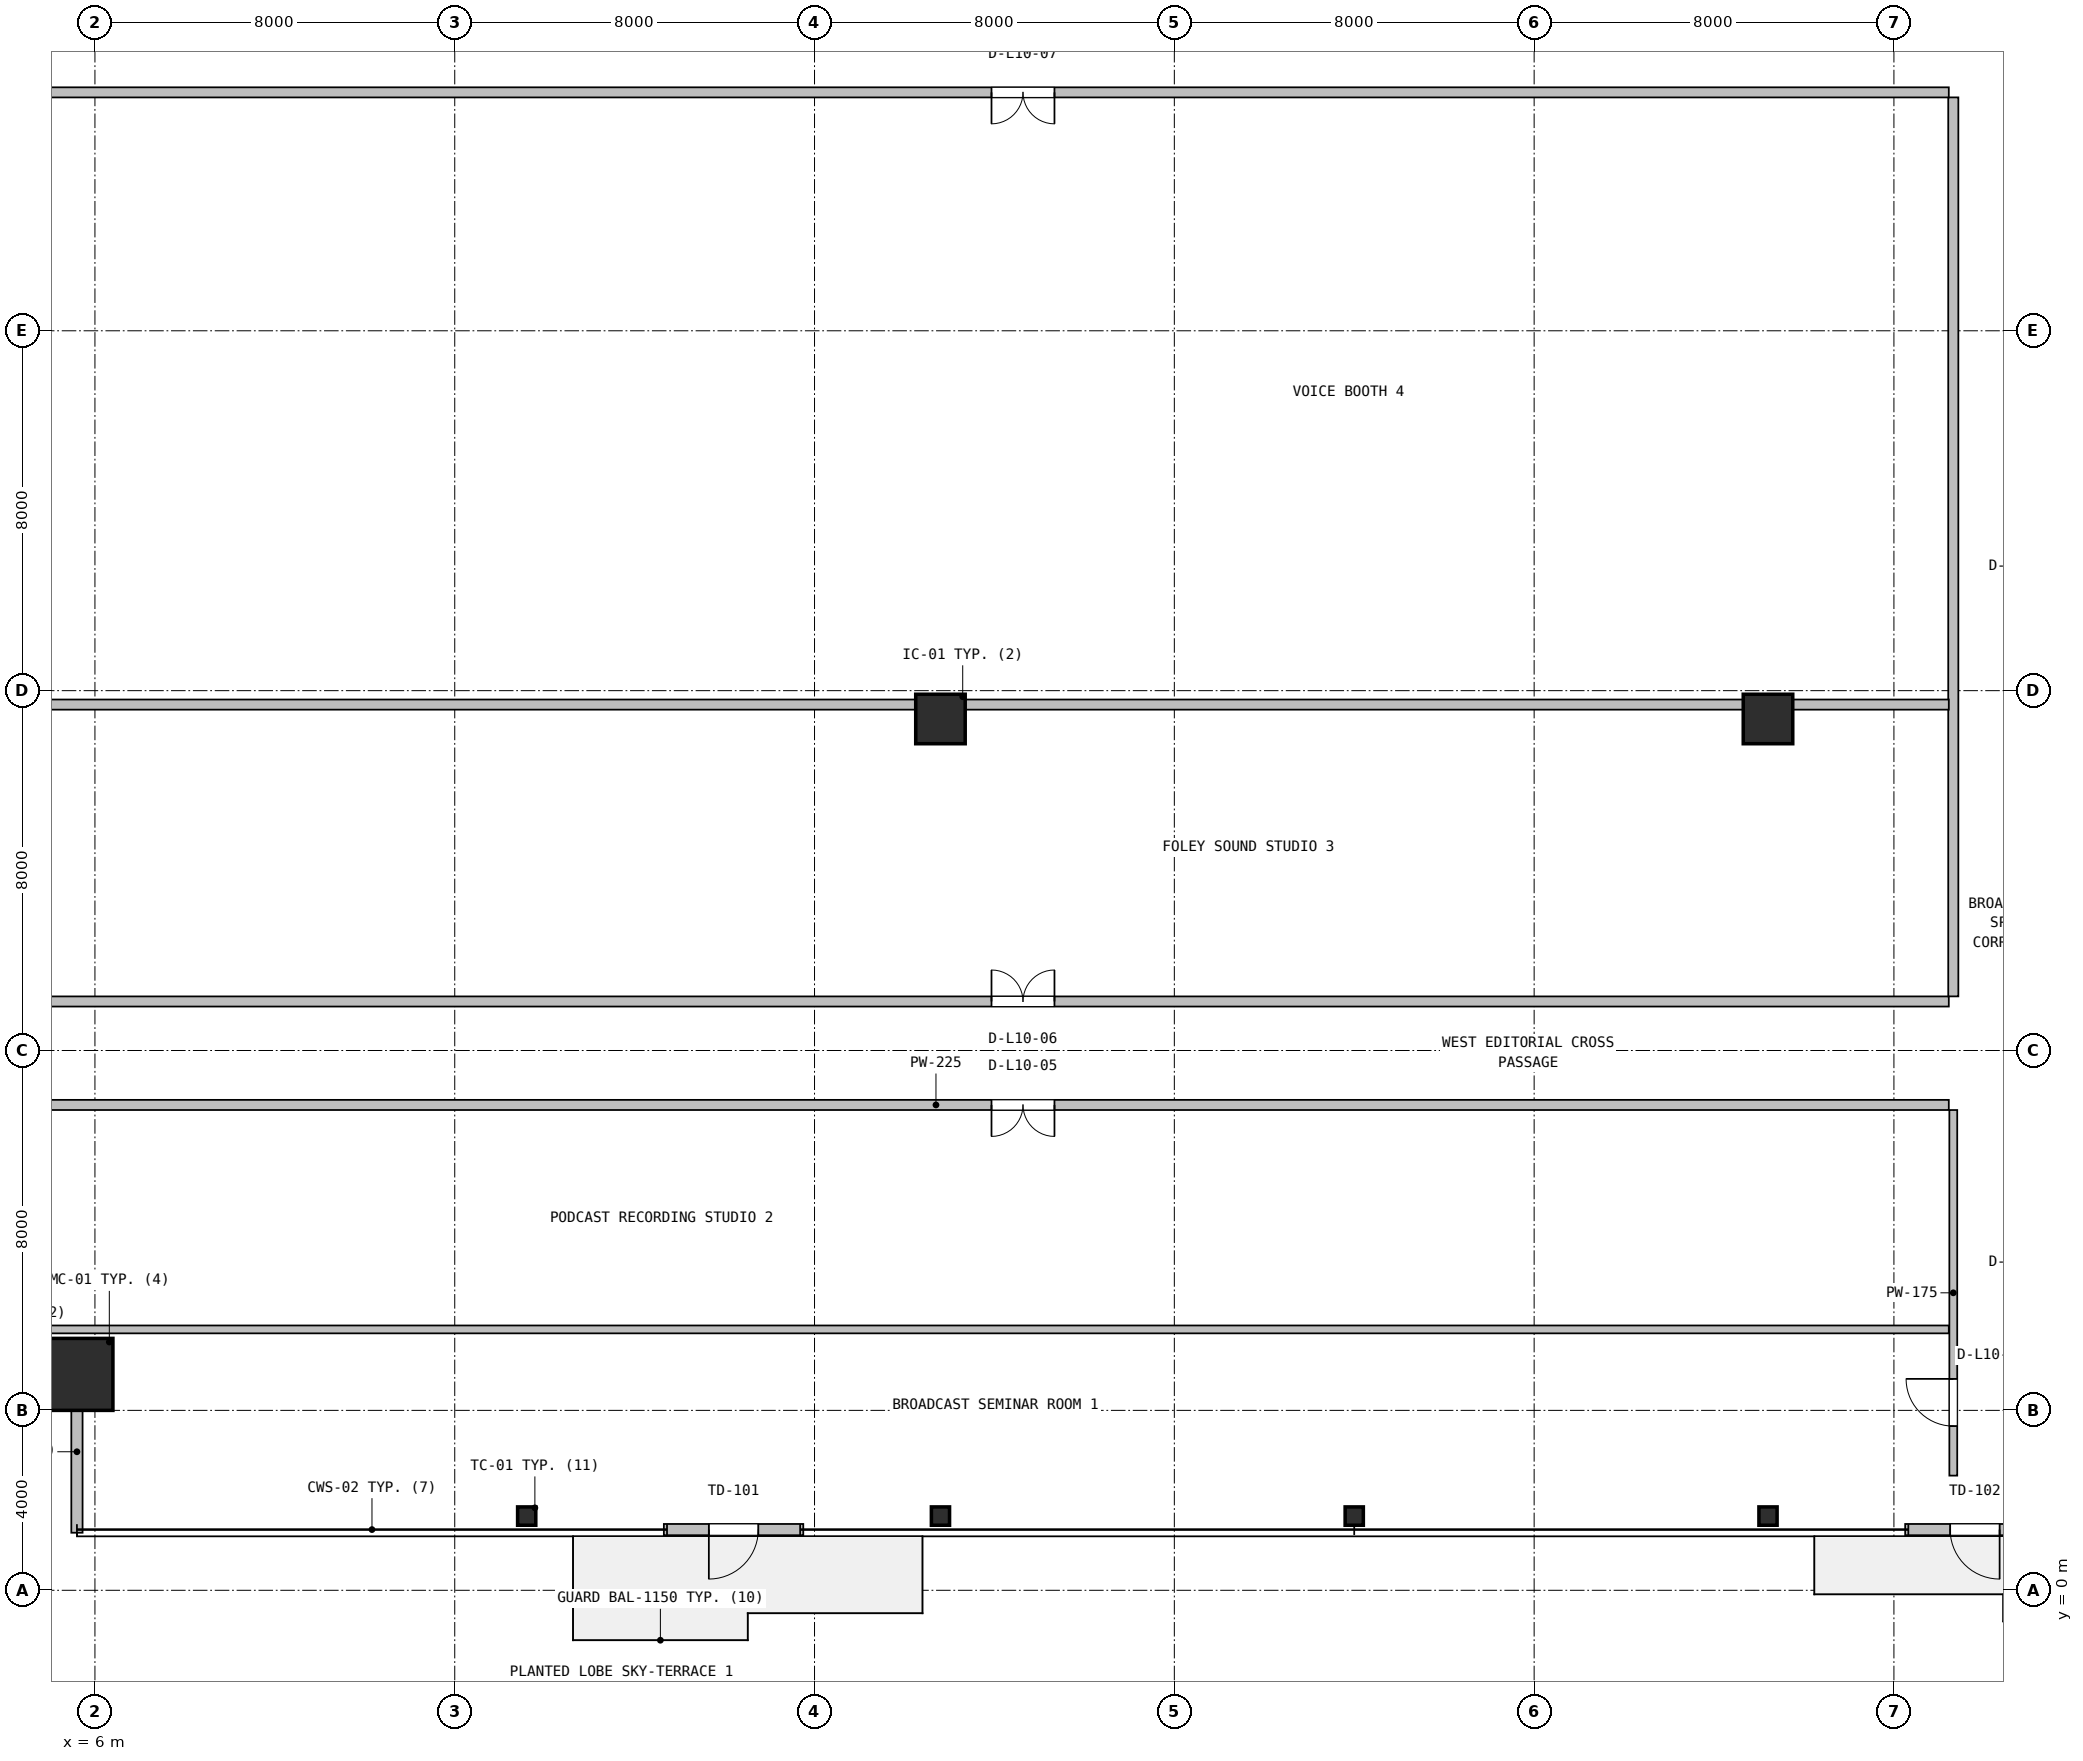
"""IFC4 building model, lengths in metres.
Left out: names, types, materials, properties, quantities, classifications, styles, units other than length and angle.
Written with IfcOpenShell. Run it as: python <this file> out.ifc"""

import sys

from ifc_helpers import new_model, si_unit, direction, frame, frame_2d, origin, origin_2d, place, context, subcontext, project, spatial, rectangle, hollow_rectangle, i_section, extrude, source, transform, mapped, element, fill, save


model = new_model("IFC4")
c1 = context("Model", 3, precision=1e-05, world=origin(), true_north=direction((0.0, 1.0)))
c2 = subcontext(c1, "Body", "Model", "MODEL_VIEW")
j1 = project(units=[si_unit("LENGTHUNIT", "METRE"), si_unit("PLANEANGLEUNIT", "RADIAN")], contexts=[c1])
p1 = place(None, origin())
s1 = spatial("IfcSite", under=j1, at=p1, CompositionType="ELEMENT")
p2 = place(p1, origin())
s2 = spatial("IfcBuilding", under=s1, at=p2, CompositionType="ELEMENT")
p3 = place(p2, frame((0.0, 0.0, 47.1)))
s3 = spatial("IfcBuildingStorey", under=s2, at=p3, CompositionType="ELEMENT", Elevation=47.1)
m1 = source(origin(), c2, "Body", "SweptSolid", [
    extrude(hollow_rectangle(XDim=1.6, YDim=1.6, WallThickness=0.06, at=origin_2d()), origin(), (0.0, 0.0, 1.0), 3.9),
])
p4 = place(p3, frame((5.6, 4.8, 0.0), z_axis=(0.0, 0.0, 1.0), x_axis=(1.0, 0.0, 0.0)))
e1 = element("IfcColumn", 1, at=p4, inside=s3, PredefinedType="COLUMN", context=c2, shape_type="MappedRepresentation", body=[
    mapped(m1, transform((0.0, 0.0, 0.0), x_axis=(1.0, 0.0, 0.0), y_axis=(0.0, 1.0, 0.0), z_axis=(0.0, 0.0, 1.0), scale=1.0)),
])
m2 = source(origin(), c2, "Body", "SweptSolid", [
    extrude(i_section(OverallWidth=0.404, OverallDepth=0.407, WebThickness=0.027, FlangeThickness=0.044, FilletRadius=0.018, at=origin_2d()), origin(), (0.0, 0.0, 1.0), 3.9),
])
for number, where, z_axis, x_axis in (
    (2, (15.6, 1.65, 0.0), (0.0, 0.0, 1.0), (1.0, 0.0, 0.0)),
    (3, (24.8, 1.65, 0.0), (0.0, 0.0, 1.0), (1.0, 0.0, 0.0)),
    (4, (34.0, 1.65, 0.0), (0.0, 0.0, 1.0), (1.0, 0.0, 0.0)),
    (5, (43.2, 1.65, 0.0), (0.0, 0.0, 1.0), (1.0, 0.0, 0.0)),
):
    element("IfcColumn", number, at=place(p3, frame(where, z_axis=z_axis, x_axis=x_axis)), inside=s3, PredefinedType="COLUMN", context=c2, shape_type="MappedRepresentation", body=[
        mapped(m2, transform((0.0, 0.0, 0.0), x_axis=(1.0, 0.0, 0.0), y_axis=(0.0, 1.0, 0.0), z_axis=(0.0, 0.0, 1.0), scale=1.0)),
    ])
m3 = source(origin(), c2, "Body", "SweptSolid", [
    extrude(rectangle(XDim=1.1, YDim=1.1, at=origin_2d()), origin(), (0.0, 0.0, 1.0), 3.9),
])
for number, where, z_axis, x_axis in (
    (6, (24.8, 19.37, 0.0), (0.0, 0.0, 1.0), (1.0, 0.0, 0.0)),
    (7, (43.2, 19.37, 0.0), (0.0, 0.0, 1.0), (1.0, 0.0, 0.0)),
):
    element("IfcColumn", number, at=place(p3, frame(where, z_axis=z_axis, x_axis=x_axis)), inside=s3, PredefinedType="COLUMN", context=c2, shape_type="MappedRepresentation", body=[
        mapped(m3, transform((0.0, 0.0, 0.0), x_axis=(1.0, 0.0, 0.0), y_axis=(0.0, 1.0, 0.0), z_axis=(0.0, 0.0, 1.0), scale=1.0)),
    ])
p5 = place(p3, frame((18.65, 1.35, 0.0), z_axis=(0.0, 0.0, 1.0), x_axis=(1.0, 0.0, 0.0)))
e8 = element("IfcWall", 8, at=p5, inside=s3, PredefinedType="SOLIDWALL", context=c2, shape_type="SweptSolid", body=[
    extrude(rectangle(XDim=3.1, YDim=0.25, at=frame_2d((1.55, 0.0))), origin(), (0.0, 0.0, 1.0), 3.63),
])
p6 = place(p5, frame((1.0, 0.0, 0.0)))
e9 = element("IfcOpeningElement", 9, at=p6, cuts=e8, PredefinedType="OPENING", context=c2, shape_type="SweptSolid", body=[
    extrude(rectangle(XDim=1.1, YDim=2.15, at=frame_2d((0.55, 1.075))), frame((0.0, 0.135, 0.0), z_axis=(0.0, -1.0, 0.0), x_axis=(1.0, 0.0, 0.0)), (0.0, 0.0, 1.0), 0.27),
])
p7 = place(p3, frame((46.25, 1.35, 0.0), z_axis=(0.0, 0.0, 1.0), x_axis=(1.0, 0.0, 0.0)))
e10 = element("IfcWall", 10, at=p7, inside=s3, PredefinedType="SOLIDWALL", context=c2, shape_type="SweptSolid", body=[
    extrude(rectangle(XDim=3.1, YDim=0.25, at=frame_2d((1.55, 0.0))), origin(), (0.0, 0.0, 1.0), 3.63),
])
p8 = place(p7, frame((1.0, 0.0, 0.0)))
e11 = element("IfcOpeningElement", 11, at=p8, cuts=e10, PredefinedType="OPENING", context=c2, shape_type="SweptSolid", body=[
    extrude(rectangle(XDim=1.1, YDim=2.15, at=frame_2d((0.55, 1.075))), frame((0.0, 0.135, 0.0), z_axis=(0.0, -1.0, 0.0), x_axis=(1.0, 0.0, 0.0)), (0.0, 0.0, 1.0), 0.27),
])
p9 = place(p3, frame((5.6, 1.28, 0.0), z_axis=(0.0, 0.0, 1.0), x_axis=(0.0, 1.0, 0.0)))
e12 = element("IfcWall", 12, at=p9, inside=s3, PredefinedType="SOLIDWALL", context=c2, shape_type="SweptSolid", body=[
    extrude(rectangle(XDim=3.6, YDim=0.25, at=frame_2d((1.8, 0.0))), origin(), (0.0, 0.0, 1.0), 3.208),
])
p10 = place(p3, frame((47.32, 2.55, 0.0), z_axis=(0.0, 0.0, 1.0), x_axis=(0.0, 1.0, 0.0)))
e13 = element("IfcWall", 13, at=p10, inside=s3, PredefinedType="PARTITIONING", context=c2, shape_type="SweptSolid", body=[
    extrude(rectangle(XDim=8.127, YDim=0.175, at=frame_2d((4.063, 0.0))), origin(), (0.0, 0.0, 1.0), 3.322),
])
p11 = place(p10, frame((1.1, 0.0, 0.0)))
e14 = element("IfcOpeningElement", 14, at=p11, cuts=e13, PredefinedType="OPENING", context=c2, shape_type="SweptSolid", body=[
    extrude(rectangle(XDim=1.05, YDim=2.1, at=frame_2d((0.525, 1.05))), frame((0.0, 0.098, 0.0), z_axis=(0.0, -1.0, 0.0), x_axis=(1.0, 0.0, 0.0)), (0.0, 0.0, 1.0), 0.195),
])
p12 = place(p3, frame((2.18, 5.8, 0.0), z_axis=(0.0, 0.0, 1.0), x_axis=(1.0, 0.0, 0.0)))
e15 = element("IfcWall", 15, at=p12, inside=s3, PredefinedType="PARTITIONING", context=c2, shape_type="SweptSolid", body=[
    extrude(rectangle(XDim=45.04, YDim=0.175, at=frame_2d((22.52, 0.0))), origin(), (0.0, 0.0, 1.0), 2.852),
])
p13 = place(p3, frame((2.18, 10.79, 0.0), z_axis=(0.0, 0.0, 1.0), x_axis=(1.0, 0.0, 0.0)))
e16 = element("IfcWall", 16, at=p13, inside=s3, PredefinedType="PARTITIONING", context=c2, shape_type="SweptSolid", body=[
    extrude(rectangle(XDim=45.04, YDim=0.225, at=frame_2d((22.52, 0.0))), origin(), (0.0, 0.0, 1.0), 2.852),
])
p14 = place(p13, frame((23.755, 0.0, 0.0)))
e17 = element("IfcOpeningElement", 17, at=p14, cuts=e16, PredefinedType="OPENING", context=c2, shape_type="SweptSolid", body=[
    extrude(rectangle(XDim=1.4, YDim=2.12, at=frame_2d((0.7, 1.06))), frame((0.0, 0.123, 0.0), z_axis=(0.0, -1.0, 0.0), x_axis=(1.0, 0.0, 0.0)), (0.0, 0.0, 1.0), 0.245),
])
p15 = place(p3, frame((2.18, 13.09, 0.0), z_axis=(0.0, 0.0, 1.0), x_axis=(1.0, 0.0, 0.0)))
e18 = element("IfcWall", 18, at=p15, inside=s3, PredefinedType="PARTITIONING", context=c2, shape_type="SweptSolid", body=[
    extrude(rectangle(XDim=45.04, YDim=0.225, at=frame_2d((22.52, 0.0))), origin(), (0.0, 0.0, 1.0), 2.852),
])
p16 = place(p15, frame((23.755, 0.0, 0.0)))
e19 = element("IfcOpeningElement", 19, at=p16, cuts=e18, PredefinedType="OPENING", context=c2, shape_type="SweptSolid", body=[
    extrude(rectangle(XDim=1.4, YDim=2.12, at=frame_2d((0.7, 1.06))), frame((0.0, 0.123, 0.0), z_axis=(0.0, -1.0, 0.0), x_axis=(1.0, 0.0, 0.0)), (0.0, 0.0, 1.0), 0.245),
])
p17 = place(p3, frame((47.32, 13.203, 0.0), z_axis=(0.0, 0.0, 1.0), x_axis=(0.0, 1.0, 0.0)))
e20 = element("IfcWall", 20, at=p17, inside=s3, PredefinedType="PARTITIONING", context=c2, shape_type="SweptSolid", body=[
    extrude(rectangle(XDim=19.985, YDim=0.225, at=frame_2d((9.993, 0.0))), origin(), (0.0, 0.0, 1.0), 3.322),
])
p18 = place(p3, frame((2.18, 19.69, 0.0), z_axis=(0.0, 0.0, 1.0), x_axis=(1.0, 0.0, 0.0)))
e21 = element("IfcWall", 21, at=p18, inside=s3, PredefinedType="PARTITIONING", context=c2, shape_type="SweptSolid", body=[
    extrude(rectangle(XDim=45.04, YDim=0.225, at=frame_2d((22.52, 0.0))), origin(), (0.0, 0.0, 1.0), 2.852),
])
p19 = place(p3, frame((2.18, 33.3, 0.0), z_axis=(0.0, 0.0, 1.0), x_axis=(1.0, 0.0, 0.0)))
e22 = element("IfcWall", 22, at=p19, inside=s3, PredefinedType="PARTITIONING", context=c2, shape_type="SweptSolid", body=[
    extrude(rectangle(XDim=45.04, YDim=0.225, at=frame_2d((22.52, 0.0))), origin(), (0.0, 0.0, 1.0), 2.852),
])
p20 = place(p19, frame((23.755, 0.0, 0.0)))
e23 = element("IfcOpeningElement", 23, at=p20, cuts=e22, PredefinedType="OPENING", context=c2, shape_type="SweptSolid", body=[
    extrude(rectangle(XDim=1.4, YDim=2.12, at=frame_2d((0.7, 1.06))), frame((0.0, 0.123, 0.0), z_axis=(0.0, -1.0, 0.0), x_axis=(1.0, 0.0, 0.0)), (0.0, 0.0, 1.0), 0.245),
])
m4 = source(origin(), c2, "Body", "SweptSolid", [
    extrude(rectangle(XDim=1.1, YDim=2.15, at=frame_2d((0.55, 1.075))), frame((0.0, 0.025, 0.0), z_axis=(0.0, -1.0, 0.0), x_axis=(1.0, 0.0, 0.0)), (0.0, 0.0, 1.0), 0.05),
])
p21 = place(p6, frame((1.1, 0.0, 0.0), z_axis=(0.0, 0.0, 1.0), x_axis=(-1.0, 0.0, 0.0)))
e24 = element("IfcDoor", 24, at=p21, inside=s3, OperationType="SINGLE_SWING_LEFT", PredefinedType="DOOR", context=c2, shape_type="MappedRepresentation", body=[
    mapped(m4, transform((0.0, 0.0, 0.0), x_axis=(1.0, 0.0, 0.0), y_axis=(0.0, 1.0, 0.0), z_axis=(0.0, 0.0, 1.0), scale=1.0)),
])
fill(e9, e24)
p22 = place(p8, frame((1.1, 0.0, 0.0), z_axis=(0.0, 0.0, 1.0), x_axis=(-1.0, 0.0, 0.0)))
e25 = element("IfcDoor", 25, at=p22, inside=s3, OperationType="SINGLE_SWING_RIGHT", PredefinedType="DOOR", context=c2, shape_type="MappedRepresentation", body=[
    mapped(m4, transform((0.0, 0.0, 0.0), x_axis=(1.0, 0.0, 0.0), y_axis=(0.0, 1.0, 0.0), z_axis=(0.0, 0.0, 1.0), scale=1.0)),
])
fill(e11, e25)
m5 = source(origin(), c2, "Body", "SweptSolid", [
    extrude(rectangle(XDim=1.05, YDim=2.1, at=frame_2d((0.525, 1.05))), frame((0.0, 0.025, 0.0), z_axis=(0.0, -1.0, 0.0), x_axis=(1.0, 0.0, 0.0)), (0.0, 0.0, 1.0), 0.05),
])
p23 = place(p11, origin())
e26 = element("IfcDoor", 26, at=p23, inside=s3, OperationType="SINGLE_SWING_RIGHT", PredefinedType="DOOR", context=c2, shape_type="MappedRepresentation", body=[
    mapped(m5, transform((0.0, 0.0, 0.0), x_axis=(1.0, 0.0, 0.0), y_axis=(0.0, 1.0, 0.0), z_axis=(0.0, 0.0, 1.0), scale=1.0)),
])
fill(e14, e26)
m6 = source(origin(), c2, "Body", "SweptSolid", [
    extrude(rectangle(XDim=1.4, YDim=2.12, at=frame_2d((0.7, 1.06))), frame((0.0, 0.025, 0.0), z_axis=(0.0, -1.0, 0.0), x_axis=(1.0, 0.0, 0.0)), (0.0, 0.0, 1.0), 0.05),
])
p24 = place(p14, frame((1.4, 0.0, 0.0), z_axis=(0.0, 0.0, 1.0), x_axis=(-1.0, 0.0, 0.0)))
e27 = element("IfcDoor", 27, at=p24, inside=s3, OperationType="DOUBLE_DOOR_SINGLE_SWING", PredefinedType="DOOR", context=c2, shape_type="MappedRepresentation", body=[
    mapped(m6, transform((0.0, 0.0, 0.0), x_axis=(1.0, 0.0, 0.0), y_axis=(0.0, 1.0, 0.0), z_axis=(0.0, 0.0, 1.0), scale=1.0)),
])
fill(e17, e27)
p25 = place(p16, origin())
e28 = element("IfcDoor", 28, at=p25, inside=s3, OperationType="DOUBLE_DOOR_SINGLE_SWING", PredefinedType="DOOR", context=c2, shape_type="MappedRepresentation", body=[
    mapped(m6, transform((0.0, 0.0, 0.0), x_axis=(1.0, 0.0, 0.0), y_axis=(0.0, 1.0, 0.0), z_axis=(0.0, 0.0, 1.0), scale=1.0)),
])
fill(e19, e28)
p26 = place(p20, frame((1.4, 0.0, 0.0), z_axis=(0.0, 0.0, 1.0), x_axis=(-1.0, 0.0, 0.0)))
e29 = element("IfcDoor", 29, at=p26, inside=s3, OperationType="DOUBLE_DOOR_SINGLE_SWING", PredefinedType="DOOR", context=c2, shape_type="MappedRepresentation", body=[
    mapped(m6, transform((0.0, 0.0, 0.0), x_axis=(1.0, 0.0, 0.0), y_axis=(0.0, 1.0, 0.0), z_axis=(0.0, 0.0, 1.0), scale=1.0)),
])
fill(e23, e29)
save(model, sys.argv[1])
